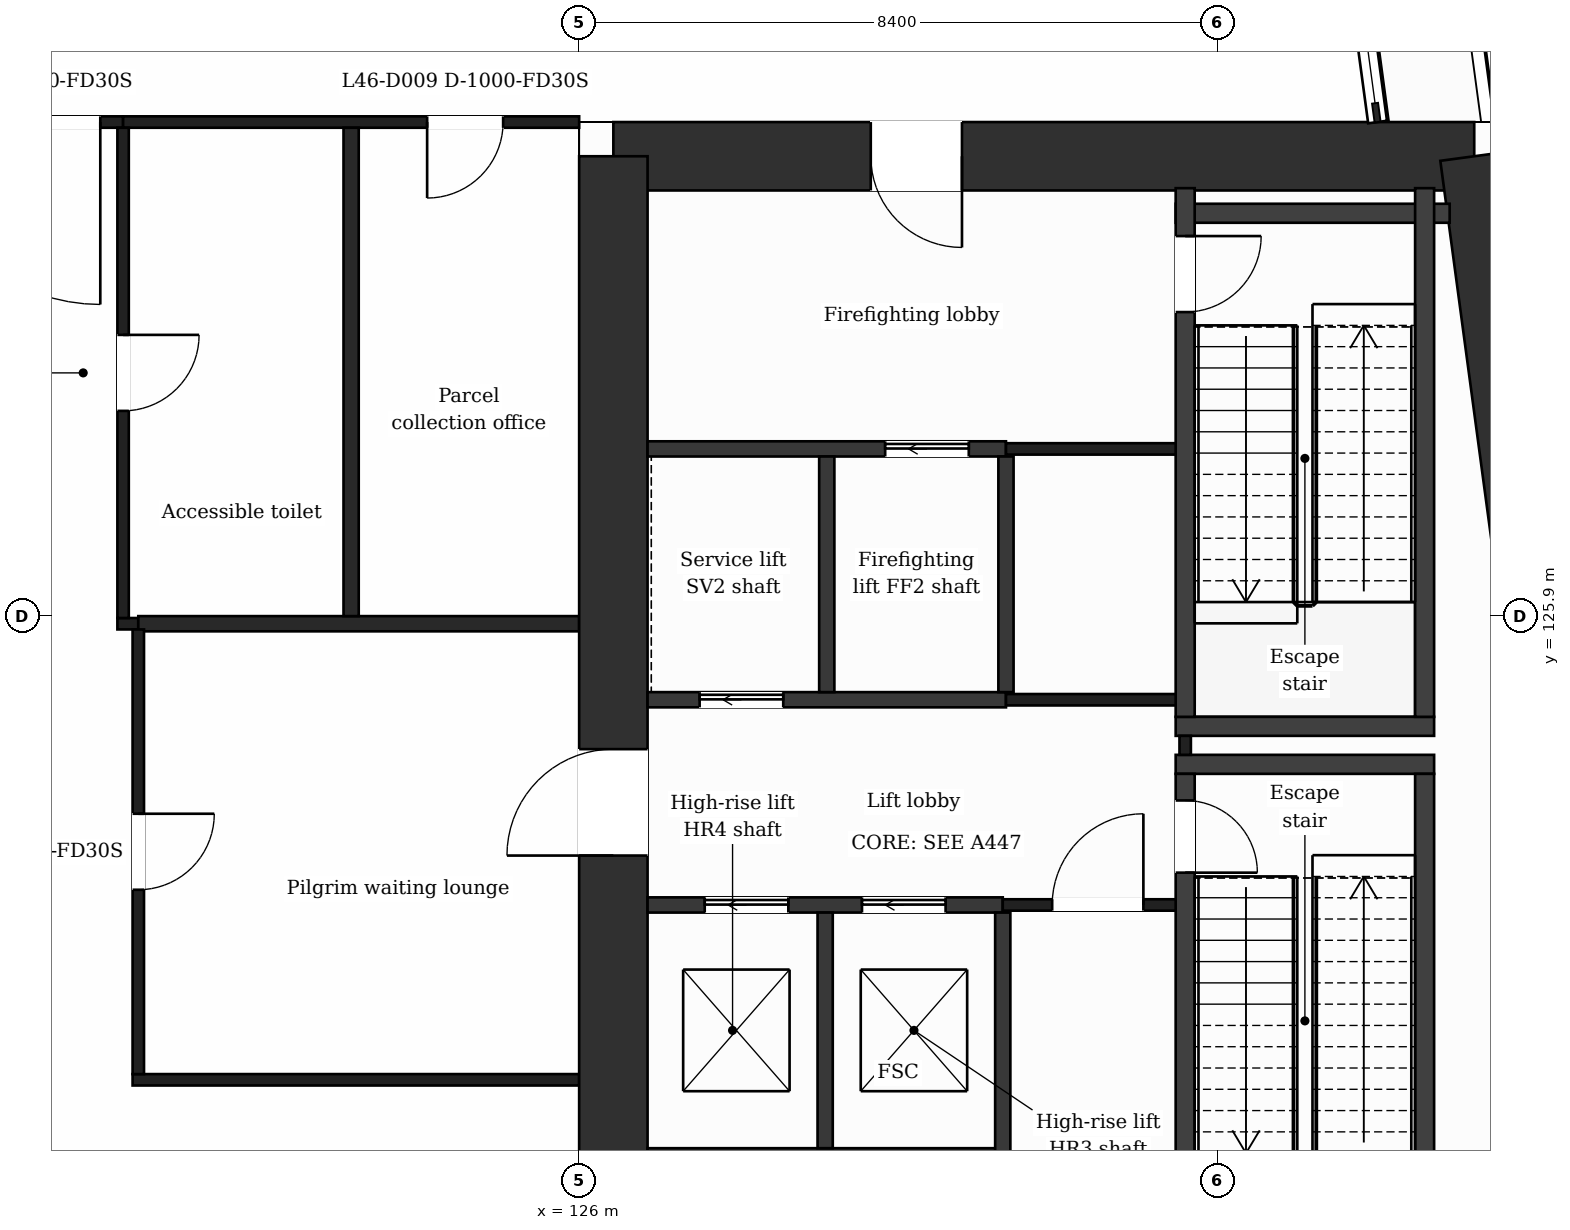
"""IFC4 building model, lengths in metres.
Left out: names, types, materials, properties, quantities, classifications, styles, units other than length and angle.
Written with IfcOpenShell. Run it as: python <this file> out.ifc"""

import sys

from ifc_helpers import new_model, si_unit, direction, frame, frame_2d, origin, place, context, subcontext, project, spatial, rectangle, extrude, element, fill, save


model = new_model("IFC4")
c1 = context("Model", 3, precision=1e-05, world=origin(), true_north=direction((0.0, 1.0)))
c2 = subcontext(c1, "Body", "Model", "MODEL_VIEW")
j1 = project(units=[si_unit("LENGTHUNIT", "METRE"), si_unit("PLANEANGLEUNIT", "RADIAN")], contexts=[c1])
p1 = place(None, origin())
s1 = spatial("IfcSite", under=j1, at=p1, CompositionType="ELEMENT")
p2 = place(p1, origin())
s2 = spatial("IfcBuilding", under=s1, at=p2, CompositionType="ELEMENT")
p3 = place(p2, frame((0.0, 0.0, 192.2)))
s3 = spatial("IfcBuildingStorey", under=s2, at=p3, CompositionType="ELEMENT", Elevation=192.2)
p4 = place(p3, frame((126.45, 131.95, 0.0), z_axis=(0.0, 0.0, 1.0), x_axis=(1.0, 0.0, 0.0)))
e1 = element("IfcWall", 1, at=p4, inside=s3, PredefinedType="SHEAR", context=c2, shape_type="SweptSolid", body=[
    extrude(rectangle(XDim=11.326, YDim=0.9, at=frame_2d((5.663, 0.0))), origin(), (0.0, 0.0, 1.0), 5.0),
])
p5 = place(p4, frame((3.386, 0.0, 0.0)))
e2 = element("IfcOpeningElement", 2, at=p5, cuts=e1, PredefinedType="OPENING", context=c2, shape_type="SweptSolid", body=[
    extrude(rectangle(XDim=1.2, YDim=2.1, at=frame_2d((0.6, 1.05))), frame((0.0, 0.46, 0.0), z_axis=(0.0, -1.0, 0.0), x_axis=(1.0, 0.0, 0.0)), (0.0, 0.0, 1.0), 0.92),
])
p6 = place(p3, frame((137.776, 131.95, 0.0), z_axis=(0.0, 0.0, 1.0), x_axis=(0.133421759112, -0.991059349482, 0.0)))
e3 = element("IfcWall", 3, at=p6, inside=s3, PredefinedType="SHEAR", context=c2, shape_type="SweptSolid", body=[
    extrude(rectangle(XDim=21.29, YDim=0.9, at=frame_2d((10.645, 0.0))), origin(), (0.0, 0.0, 1.0), 5.0),
])
p7 = place(p3, frame((126.45, 110.85, 0.0), z_axis=(0.0, 0.0, 1.0), x_axis=(0.0, 1.0, 0.0)))
e4 = element("IfcWall", 4, at=p7, inside=s3, PredefinedType="SHEAR", context=c2, shape_type="SweptSolid", body=[
    extrude(rectangle(XDim=21.1, YDim=0.9, at=frame_2d((10.55, 0.0))), origin(), (0.0, 0.0, 1.0), 5.0),
])
p8 = place(p7, frame((11.9, 0.0, 0.0)))
e5 = element("IfcOpeningElement", 5, at=p8, cuts=e4, PredefinedType="OPENING", context=c2, shape_type="SweptSolid", body=[
    extrude(rectangle(XDim=1.4, YDim=2.1, at=frame_2d((0.7, 1.05))), frame((0.0, 0.46, 0.0), z_axis=(0.0, -1.0, 0.0), x_axis=(1.0, 0.0, 0.0)), (0.0, 0.0, 1.0), 0.92),
])
p9 = place(p3, frame((126.9, 118.8, 0.0), z_axis=(0.0, 0.0, 1.0), x_axis=(1.0, 0.0, 0.0)))
e6 = element("IfcWall", 6, at=p9, inside=s3, PredefinedType="PARTITIONING", context=c2, shape_type="SweptSolid", body=[
    extrude(rectangle(XDim=4.673, YDim=0.2, at=frame_2d((2.336, 0.0))), origin(), (0.0, 0.0, 1.0), 4.5),
])
p10 = place(p3, frame((120.125, 119.8, 0.0), z_axis=(0.0, 0.0, 1.0), x_axis=(1.0, 0.0, 0.0)))
e7 = element("IfcWall", 7, at=p10, inside=s3, PredefinedType="PARTITIONING", context=c2, shape_type="SweptSolid", body=[
    extrude(rectangle(XDim=5.875, YDim=0.15, at=frame_2d((2.938, 0.0))), origin(), (0.0, 0.0, 1.0), 4.5),
])
p11 = place(p3, frame((126.9, 122.1, 0.0), z_axis=(0.0, 0.0, 1.0), x_axis=(1.0, 0.0, 0.0)))
e8 = element("IfcWall", 8, at=p11, inside=s3, PredefinedType="PARTITIONING", context=c2, shape_type="SweptSolid", body=[
    extrude(rectangle(XDim=4.673, YDim=0.2, at=frame_2d((2.336, 0.0))), origin(), (0.0, 0.0, 1.0), 4.5),
])
p12 = place(p11, frame((2.821, 0.0, 0.0)))
e9 = element("IfcOpeningElement", 9, at=p12, cuts=e8, PredefinedType="OPENING", context=c2, shape_type="SweptSolid", body=[
    extrude(rectangle(XDim=1.1, YDim=2.1, at=frame_2d((0.55, 1.05))), frame((0.0, 0.11, 0.0), z_axis=(0.0, -1.0, 0.0), x_axis=(1.0, 0.0, 0.0)), (0.0, 0.0, 1.0), 0.22),
])
p13 = place(p11, frame((0.752, 0.0, 0.0)))
e10 = element("IfcOpeningElement", 10, at=p13, cuts=e8, PredefinedType="OPENING", context=c2, shape_type="SweptSolid", body=[
    extrude(rectangle(XDim=1.1, YDim=2.1, at=frame_2d((0.55, 1.05))), frame((0.0, 0.11, 0.0), z_axis=(0.0, -1.0, 0.0), x_axis=(1.0, 0.0, 0.0)), (0.0, 0.0, 1.0), 0.22),
])
p14 = place(p3, frame((131.573, 122.1, 0.0), z_axis=(0.0, 0.0, 1.0), x_axis=(1.0, 0.0, 0.0)))
e11 = element("IfcWall", 11, at=p14, inside=s3, PredefinedType="PARTITIONING", context=c2, shape_type="SweptSolid", body=[
    extrude(rectangle(XDim=2.4, YDim=0.15, at=frame_2d((1.2, 0.0))), origin(), (0.0, 0.0, 1.0), 4.5),
])
p15 = place(p14, frame((0.65, 0.0, 0.0)))
e12 = element("IfcOpeningElement", 12, at=p15, cuts=e11, PredefinedType="OPENING", context=c2, shape_type="SweptSolid", body=[
    extrude(rectangle(XDim=1.2, YDim=2.1, at=frame_2d((0.6, 1.05))), frame((0.0, 0.085, 0.0), z_axis=(0.0, -1.0, 0.0), x_axis=(1.0, 0.0, 0.0)), (0.0, 0.0, 1.0), 0.17),
])
for number, where, z_axis, x_axis in (
    (13, (133.848, 123.95, 0.0), (0.0, 0.0, 1.0), (1.0, 0.0, 0.0)),
    (14, (133.848, 124.45, 0.0), (0.0, 0.0, 1.0), (1.0, 0.0, 0.0)),
):
    element("IfcWall", number, at=place(p3, frame(where, z_axis=z_axis, x_axis=x_axis)), inside=s3, PredefinedType="PARTITIONING", context=c2, shape_type="SweptSolid", body=[
        extrude(rectangle(XDim=3.4, YDim=0.25, at=frame_2d((1.7, 0.0))), origin(), (0.0, 0.0, 1.0), 4.5),
    ])
p16 = place(p3, frame((126.9, 124.8, 0.0), z_axis=(0.0, 0.0, 1.0), x_axis=(1.0, 0.0, 0.0)))
e15 = element("IfcWall", 15, at=p16, inside=s3, PredefinedType="PARTITIONING", context=c2, shape_type="SweptSolid", body=[
    extrude(rectangle(XDim=4.715, YDim=0.2, at=frame_2d((2.358, 0.0))), origin(), (0.0, 0.0, 1.0), 4.5),
])
p17 = place(p16, frame((0.685, 0.0, 0.0)))
e16 = element("IfcOpeningElement", 16, at=p17, cuts=e15, PredefinedType="OPENING", context=c2, shape_type="SweptSolid", body=[
    extrude(rectangle(XDim=1.1, YDim=2.1, at=frame_2d((0.55, 1.05))), frame((0.0, 0.11, 0.0), z_axis=(0.0, -1.0, 0.0), x_axis=(1.0, 0.0, 0.0)), (0.0, 0.0, 1.0), 0.22),
])
p18 = place(p3, frame((131.615, 124.8, 0.0), z_axis=(0.0, 0.0, 1.0), x_axis=(1.0, 0.0, 0.0)))
e17 = element("IfcWall", 17, at=p18, inside=s3, PredefinedType="PARTITIONING", context=c2, shape_type="SweptSolid", body=[
    extrude(rectangle(XDim=2.483, YDim=0.15, at=frame_2d((1.241, 0.0))), origin(), (0.0, 0.0, 1.0), 4.5),
])
p19 = place(p3, frame((119.925, 125.8, 0.0), z_axis=(0.0, 0.0, 1.0), x_axis=(1.0, 0.0, 0.0)))
e18 = element("IfcWall", 18, at=p19, inside=s3, PredefinedType="PARTITIONING", context=c2, shape_type="SweptSolid", body=[
    extrude(rectangle(XDim=0.275, YDim=0.15, at=frame_2d((0.137, 0.0))), origin(), (0.0, 0.0, 1.0), 4.5),
])
p20 = place(p3, frame((120.2, 125.8, 0.0), z_axis=(0.0, 0.0, 1.0), x_axis=(1.0, 0.0, 0.0)))
e19 = element("IfcWall", 19, at=p20, inside=s3, PredefinedType="PARTITIONING", context=c2, shape_type="SweptSolid", body=[
    extrude(rectangle(XDim=5.8, YDim=0.2, at=frame_2d((2.9, 0.0))), origin(), (0.0, 0.0, 1.0), 4.5),
])
p21 = place(p3, frame((126.9, 128.1, 0.0), z_axis=(0.0, 0.0, 1.0), x_axis=(1.0, 0.0, 0.0)))
e20 = element("IfcWall", 20, at=p21, inside=s3, PredefinedType="PARTITIONING", context=c2, shape_type="SweptSolid", body=[
    extrude(rectangle(XDim=4.715, YDim=0.2, at=frame_2d((2.358, 0.0))), origin(), (0.0, 0.0, 1.0), 4.5),
])
p22 = place(p21, frame((3.126, 0.0, 0.0)))
e21 = element("IfcOpeningElement", 21, at=p22, cuts=e20, PredefinedType="OPENING", context=c2, shape_type="SweptSolid", body=[
    extrude(rectangle(XDim=1.1, YDim=2.1, at=frame_2d((0.55, 1.05))), frame((0.0, 0.11, 0.0), z_axis=(0.0, -1.0, 0.0), x_axis=(1.0, 0.0, 0.0)), (0.0, 0.0, 1.0), 0.22),
])
p23 = place(p3, frame((131.615, 128.1, 0.0), z_axis=(0.0, 0.0, 1.0), x_axis=(1.0, 0.0, 0.0)))
e22 = element("IfcWall", 22, at=p23, inside=s3, PredefinedType="PARTITIONING", context=c2, shape_type="SweptSolid", body=[
    extrude(rectangle(XDim=2.358, YDim=0.15, at=frame_2d((1.179, 0.0))), origin(), (0.0, 0.0, 1.0), 4.5),
])
p24 = place(p3, frame((133.848, 131.2, 0.0), z_axis=(0.0, 0.0, 1.0), x_axis=(1.0, 0.0, 0.0)))
e23 = element("IfcWall", 23, at=p24, inside=s3, PredefinedType="PARTITIONING", context=c2, shape_type="SweptSolid", body=[
    extrude(rectangle(XDim=3.605, YDim=0.25, at=frame_2d((1.802, 0.0))), origin(), (0.0, 0.0, 1.0), 4.5),
])
p25 = place(p3, frame((117.0, 132.4, 0.0), z_axis=(0.0, 0.0, 1.0), x_axis=(1.0, 0.0, 0.0)))
e24 = element("IfcWall", 24, at=p25, inside=s3, PredefinedType="PARTITIONING", context=c2, shape_type="SweptSolid", body=[
    extrude(rectangle(XDim=3.0, YDim=0.15, at=frame_2d((1.5, 0.0))), origin(), (0.0, 0.0, 1.0), 4.5),
])
p26 = place(p25, frame((0.3, 0.0, 0.0)))
e25 = element("IfcOpeningElement", 25, at=p26, cuts=e24, PredefinedType="OPENING", context=c2, shape_type="SweptSolid", body=[
    extrude(rectangle(XDim=2.4, YDim=2.1, at=frame_2d((1.2, 1.05))), frame((0.0, 0.085, 0.0), z_axis=(0.0, -1.0, 0.0), x_axis=(1.0, 0.0, 0.0)), (0.0, 0.0, 1.0), 0.17),
])
p27 = place(p3, frame((120.0, 132.4, 0.0), z_axis=(0.0, 0.0, 1.0), x_axis=(1.0, 0.0, 0.0)))
e26 = element("IfcWall", 26, at=p27, inside=s3, PredefinedType="PARTITIONING", context=c2, shape_type="SweptSolid", body=[
    extrude(rectangle(XDim=6.0, YDim=0.15, at=frame_2d((3.0, 0.0))), origin(), (0.0, 0.0, 1.0), 4.5),
])
p28 = place(p27, frame((4.0, 0.0, 0.0)))
e27 = element("IfcOpeningElement", 27, at=p28, cuts=e26, PredefinedType="OPENING", context=c2, shape_type="SweptSolid", body=[
    extrude(rectangle(XDim=1.0, YDim=2.1, at=frame_2d((0.5, 1.05))), frame((0.0, 0.085, 0.0), z_axis=(0.0, -1.0, 0.0), x_axis=(1.0, 0.0, 0.0)), (0.0, 0.0, 1.0), 0.17),
])
p29 = place(p3, frame((120.0, 125.875, 0.0), z_axis=(0.0, 0.0, 1.0), x_axis=(0.0, 1.0, 0.0)))
e28 = element("IfcWall", 28, at=p29, inside=s3, PredefinedType="PARTITIONING", context=c2, shape_type="SweptSolid", body=[
    extrude(rectangle(XDim=6.45, YDim=0.15, at=frame_2d((3.225, 0.0))), origin(), (0.0, 0.0, 1.0), 4.5),
])
p30 = place(p29, frame((2.725, 0.0, 0.0)))
e29 = element("IfcOpeningElement", 29, at=p30, cuts=e28, PredefinedType="OPENING", context=c2, shape_type="SweptSolid", body=[
    extrude(rectangle(XDim=1.0, YDim=2.1, at=frame_2d((0.5, 1.05))), frame((0.0, 0.085, 0.0), z_axis=(0.0, -1.0, 0.0), x_axis=(1.0, 0.0, 0.0)), (0.0, 0.0, 1.0), 0.17),
])
p31 = place(p3, frame((120.2, 119.875, 0.0), z_axis=(0.0, 0.0, 1.0), x_axis=(0.0, 1.0, 0.0)))
e30 = element("IfcWall", 30, at=p31, inside=s3, PredefinedType="PARTITIONING", context=c2, shape_type="SweptSolid", body=[
    extrude(rectangle(XDim=5.85, YDim=0.15, at=frame_2d((2.925, 0.0))), origin(), (0.0, 0.0, 1.0), 4.5),
])
p32 = place(p31, frame((2.425, 0.0, 0.0)))
e31 = element("IfcOpeningElement", 31, at=p32, cuts=e30, PredefinedType="OPENING", context=c2, shape_type="SweptSolid", body=[
    extrude(rectangle(XDim=1.0, YDim=2.1, at=frame_2d((0.5, 1.05))), frame((0.0, 0.085, 0.0), z_axis=(0.0, -1.0, 0.0), x_axis=(1.0, 0.0, 0.0)), (0.0, 0.0, 1.0), 0.17),
])
p33 = place(p3, frame((123.0, 125.9, 0.0), z_axis=(0.0, 0.0, 1.0), x_axis=(0.0, 1.0, 0.0)))
e32 = element("IfcWall", 32, at=p33, inside=s3, PredefinedType="PARTITIONING", context=c2, shape_type="SweptSolid", body=[
    extrude(rectangle(XDim=6.425, YDim=0.2, at=frame_2d((3.212, 0.0))), origin(), (0.0, 0.0, 1.0), 4.5),
])
for number, where, z_axis, x_axis in (
    (33, (129.237, 118.9, 0.0), (0.0, 0.0, 1.0), (0.0, 1.0, 0.0)),
    (34, (129.258, 124.9, 0.0), (0.0, 0.0, 1.0), (0.0, 1.0, 0.0)),
):
    element("IfcWall", number, at=place(p3, frame(where, z_axis=z_axis, x_axis=x_axis)), inside=s3, PredefinedType="PARTITIONING", context=c2, shape_type="SweptSolid", body=[
        extrude(rectangle(XDim=3.1, YDim=0.2, at=frame_2d((1.55, 0.0))), origin(), (0.0, 0.0, 1.0), 4.5),
    ])
p34 = place(p3, frame((131.573, 116.87, 0.0), z_axis=(0.0, 0.0, 1.0), x_axis=(0.0, 1.0, 0.0)))
e35 = element("IfcWall", 35, at=p34, inside=s3, PredefinedType="PARTITIONING", context=c2, shape_type="SweptSolid", body=[
    extrude(rectangle(XDim=5.13, YDim=0.2, at=frame_2d((2.565, 0.0))), origin(), (0.0, 0.0, 1.0), 4.5),
])
p35 = place(p34, frame((0.68, 0.0, 0.0)))
e36 = element("IfcOpeningElement", 36, at=p35, cuts=e35, PredefinedType="OPENING", context=c2, shape_type="SweptSolid", body=[
    extrude(rectangle(XDim=0.9, YDim=2.1, at=frame_2d((0.45, 1.05))), frame((0.0, 0.11, 0.0), z_axis=(0.0, -1.0, 0.0), x_axis=(1.0, 0.0, 0.0)), (0.0, 0.0, 1.0), 0.22),
])
p36 = place(p3, frame((131.615, 124.9, 0.0), z_axis=(0.0, 0.0, 1.0), x_axis=(0.0, 1.0, 0.0)))
e37 = element("IfcWall", 37, at=p36, inside=s3, PredefinedType="PARTITIONING", context=c2, shape_type="SweptSolid", body=[
    extrude(rectangle(XDim=3.1, YDim=0.2, at=frame_2d((1.55, 0.0))), origin(), (0.0, 0.0, 1.0), 4.5),
])
p37 = place(p3, frame((133.973, 124.075, 0.0), z_axis=(0.0, 0.0, 1.0), x_axis=(0.0, 1.0, 0.0)))
e38 = element("IfcWall", 38, at=p37, inside=s3, PredefinedType="PARTITIONING", context=c2, shape_type="SweptSolid", body=[
    extrude(rectangle(XDim=0.25, YDim=0.15, at=frame_2d((0.125, 0.0))), origin(), (0.0, 0.0, 1.0), 4.5),
])
p38 = place(p3, frame((133.973, 116.87, 0.0), z_axis=(0.0, 0.0, 1.0), x_axis=(0.0, 1.0, 0.0)))
e39 = element("IfcWall", 39, at=p38, inside=s3, PredefinedType="PARTITIONING", context=c2, shape_type="SweptSolid", body=[
    extrude(rectangle(XDim=6.955, YDim=0.25, at=frame_2d((3.478, 0.0))), origin(), (0.0, 0.0, 1.0), 4.5),
])
p39 = place(p38, frame((5.655, 0.0, 0.0)))
e40 = element("IfcOpeningElement", 40, at=p39, cuts=e39, PredefinedType="OPENING", context=c2, shape_type="SweptSolid", body=[
    extrude(rectangle(XDim=0.95, YDim=2.1, at=frame_2d((0.475, 1.05))), frame((0.0, 0.135, 0.0), z_axis=(0.0, -1.0, 0.0), x_axis=(1.0, 0.0, 0.0)), (0.0, 0.0, 1.0), 0.27),
])
p40 = place(p3, frame((133.973, 124.575, 0.0), z_axis=(0.0, 0.0, 1.0), x_axis=(0.0, 1.0, 0.0)))
e41 = element("IfcWall", 41, at=p40, inside=s3, PredefinedType="PARTITIONING", context=c2, shape_type="SweptSolid", body=[
    extrude(rectangle(XDim=6.955, YDim=0.25, at=frame_2d((3.478, 0.0))), origin(), (0.0, 0.0, 1.0), 4.5),
])
p41 = place(p40, frame((5.325, 0.0, 0.0)))
e42 = element("IfcOpeningElement", 42, at=p41, cuts=e41, PredefinedType="OPENING", context=c2, shape_type="SweptSolid", body=[
    extrude(rectangle(XDim=1.0, YDim=2.1, at=frame_2d((0.5, 1.05))), frame((0.0, 0.135, 0.0), z_axis=(0.0, -1.0, 0.0), x_axis=(1.0, 0.0, 0.0)), (0.0, 0.0, 1.0), 0.27),
])
p42 = place(p3, frame((137.123, 116.87, 0.0), z_axis=(0.0, 0.0, 1.0), x_axis=(0.0, 1.0, 0.0)))
e43 = element("IfcWall", 43, at=p42, inside=s3, PredefinedType="PARTITIONING", context=c2, shape_type="SweptSolid", body=[
    extrude(rectangle(XDim=6.955, YDim=0.25, at=frame_2d((3.478, 0.0))), origin(), (0.0, 0.0, 1.0), 4.5),
])
p43 = place(p3, frame((137.123, 124.575, 0.0), z_axis=(0.0, 0.0, 1.0), x_axis=(0.0, 1.0, 0.0)))
e44 = element("IfcWall", 44, at=p43, inside=s3, PredefinedType="PARTITIONING", context=c2, shape_type="SweptSolid", body=[
    extrude(rectangle(XDim=6.955, YDim=0.25, at=frame_2d((3.478, 0.0))), origin(), (0.0, 0.0, 1.0), 4.5),
])
p44 = place(p32, origin())
e45 = element("IfcDoor", 45, at=p44, inside=s3, OperationType="SINGLE_SWING_RIGHT", PredefinedType="DOOR", context=c2, shape_type="SweptSolid", body=[
    extrude(rectangle(XDim=1.0, YDim=2.1, at=frame_2d((0.5, 1.05))), frame((0.0, 0.025, 0.0), z_axis=(0.0, -1.0, 0.0), x_axis=(1.0, 0.0, 0.0)), (0.0, 0.0, 1.0), 0.05),
])
fill(e31, e45)
p45 = place(p26, origin())
e46 = element("IfcDoor", 46, at=p45, inside=s3, OperationType="SINGLE_SWING_RIGHT", PredefinedType="DOOR", context=c2, shape_type="SweptSolid", body=[
    extrude(rectangle(XDim=2.4, YDim=2.1, at=frame_2d((1.2, 1.05))), frame((0.0, 0.025, 0.0), z_axis=(0.0, -1.0, 0.0), x_axis=(1.0, 0.0, 0.0)), (0.0, 0.0, 1.0), 0.05),
])
fill(e25, e46)
p46 = place(p30, origin())
e47 = element("IfcDoor", 47, at=p46, inside=s3, OperationType="SINGLE_SWING_RIGHT", PredefinedType="DOOR", context=c2, shape_type="SweptSolid", body=[
    extrude(rectangle(XDim=1.0, YDim=2.1, at=frame_2d((0.5, 1.05))), frame((0.0, 0.025, 0.0), z_axis=(0.0, -1.0, 0.0), x_axis=(1.0, 0.0, 0.0)), (0.0, 0.0, 1.0), 0.05),
])
fill(e29, e47)
p47 = place(p28, origin())
e48 = element("IfcDoor", 48, at=p47, inside=s3, OperationType="SINGLE_SWING_LEFT", PredefinedType="DOOR", context=c2, shape_type="SweptSolid", body=[
    extrude(rectangle(XDim=1.0, YDim=2.1, at=frame_2d((0.5, 1.05))), frame((0.0, 0.025, 0.0), z_axis=(0.0, -1.0, 0.0), x_axis=(1.0, 0.0, 0.0)), (0.0, 0.0, 1.0), 0.05),
])
fill(e27, e48)
p48 = place(p15, origin())
e49 = element("IfcDoor", 49, at=p48, inside=s3, OperationType="SINGLE_SWING_RIGHT", PredefinedType="DOOR", context=c2, shape_type="SweptSolid", body=[
    extrude(rectangle(XDim=1.2, YDim=2.1, at=frame_2d((0.6, 1.05))), frame((0.0, 0.025, 0.0), z_axis=(0.0, -1.0, 0.0), x_axis=(1.0, 0.0, 0.0)), (0.0, 0.0, 1.0), 0.05),
])
fill(e12, e49)
p49 = place(p12, origin())
e50 = element("IfcDoor", 50, at=p49, inside=s3, OperationType="SLIDING_TO_LEFT", PredefinedType="DOOR", context=c2, shape_type="SweptSolid", body=[
    extrude(rectangle(XDim=1.1, YDim=2.1, at=frame_2d((0.55, 1.05))), frame((0.0, 0.025, 0.0), z_axis=(0.0, -1.0, 0.0), x_axis=(1.0, 0.0, 0.0)), (0.0, 0.0, 1.0), 0.05),
])
fill(e9, e50)
p50 = place(p13, origin())
e51 = element("IfcDoor", 51, at=p50, inside=s3, OperationType="SLIDING_TO_LEFT", PredefinedType="DOOR", context=c2, shape_type="SweptSolid", body=[
    extrude(rectangle(XDim=1.1, YDim=2.1, at=frame_2d((0.55, 1.05))), frame((0.0, 0.025, 0.0), z_axis=(0.0, -1.0, 0.0), x_axis=(1.0, 0.0, 0.0)), (0.0, 0.0, 1.0), 0.05),
])
fill(e10, e51)
p51 = place(p22, origin())
e52 = element("IfcDoor", 52, at=p51, inside=s3, OperationType="SLIDING_TO_LEFT", PredefinedType="DOOR", context=c2, shape_type="SweptSolid", body=[
    extrude(rectangle(XDim=1.1, YDim=2.1, at=frame_2d((0.55, 1.05))), frame((0.0, 0.025, 0.0), z_axis=(0.0, -1.0, 0.0), x_axis=(1.0, 0.0, 0.0)), (0.0, 0.0, 1.0), 0.05),
])
fill(e21, e52)
p52 = place(p17, origin())
e53 = element("IfcDoor", 53, at=p52, inside=s3, OperationType="SLIDING_TO_LEFT", PredefinedType="DOOR", context=c2, shape_type="SweptSolid", body=[
    extrude(rectangle(XDim=1.1, YDim=2.1, at=frame_2d((0.55, 1.05))), frame((0.0, 0.025, 0.0), z_axis=(0.0, -1.0, 0.0), x_axis=(1.0, 0.0, 0.0)), (0.0, 0.0, 1.0), 0.05),
])
fill(e16, e53)
p53 = place(p39, origin())
e54 = element("IfcDoor", 54, at=p53, inside=s3, OperationType="SINGLE_SWING_LEFT", PredefinedType="DOOR", context=c2, shape_type="SweptSolid", body=[
    extrude(rectangle(XDim=0.95, YDim=2.1, at=frame_2d((0.475, 1.05))), frame((0.0, 0.025, 0.0), z_axis=(0.0, -1.0, 0.0), x_axis=(1.0, 0.0, 0.0)), (0.0, 0.0, 1.0), 0.05),
])
fill(e40, e54)
p54 = place(p41, origin())
e55 = element("IfcDoor", 55, at=p54, inside=s3, OperationType="SINGLE_SWING_RIGHT", PredefinedType="DOOR", context=c2, shape_type="SweptSolid", body=[
    extrude(rectangle(XDim=1.0, YDim=2.1, at=frame_2d((0.5, 1.05))), frame((0.0, 0.025, 0.0), z_axis=(0.0, -1.0, 0.0), x_axis=(1.0, 0.0, 0.0)), (0.0, 0.0, 1.0), 0.05),
])
fill(e42, e55)
p55 = place(p5, origin())
e56 = element("IfcDoor", 56, at=p55, inside=s3, OperationType="SINGLE_SWING_RIGHT", PredefinedType="DOOR", context=c2, shape_type="SweptSolid", body=[
    extrude(rectangle(XDim=1.2, YDim=2.1, at=frame_2d((0.6, 1.05))), frame((0.0, 0.025, 0.0), z_axis=(0.0, -1.0, 0.0), x_axis=(1.0, 0.0, 0.0)), (0.0, 0.0, 1.0), 0.05),
])
fill(e2, e56)
p56 = place(p8, origin())
e57 = element("IfcDoor", 57, at=p56, inside=s3, OperationType="SINGLE_SWING_LEFT", PredefinedType="DOOR", context=c2, shape_type="SweptSolid", body=[
    extrude(rectangle(XDim=1.4, YDim=2.1, at=frame_2d((0.7, 1.05))), frame((0.0, 0.025, 0.0), z_axis=(0.0, -1.0, 0.0), x_axis=(1.0, 0.0, 0.0)), (0.0, 0.0, 1.0), 0.05),
])
fill(e5, e57)
save(model, sys.argv[1])
